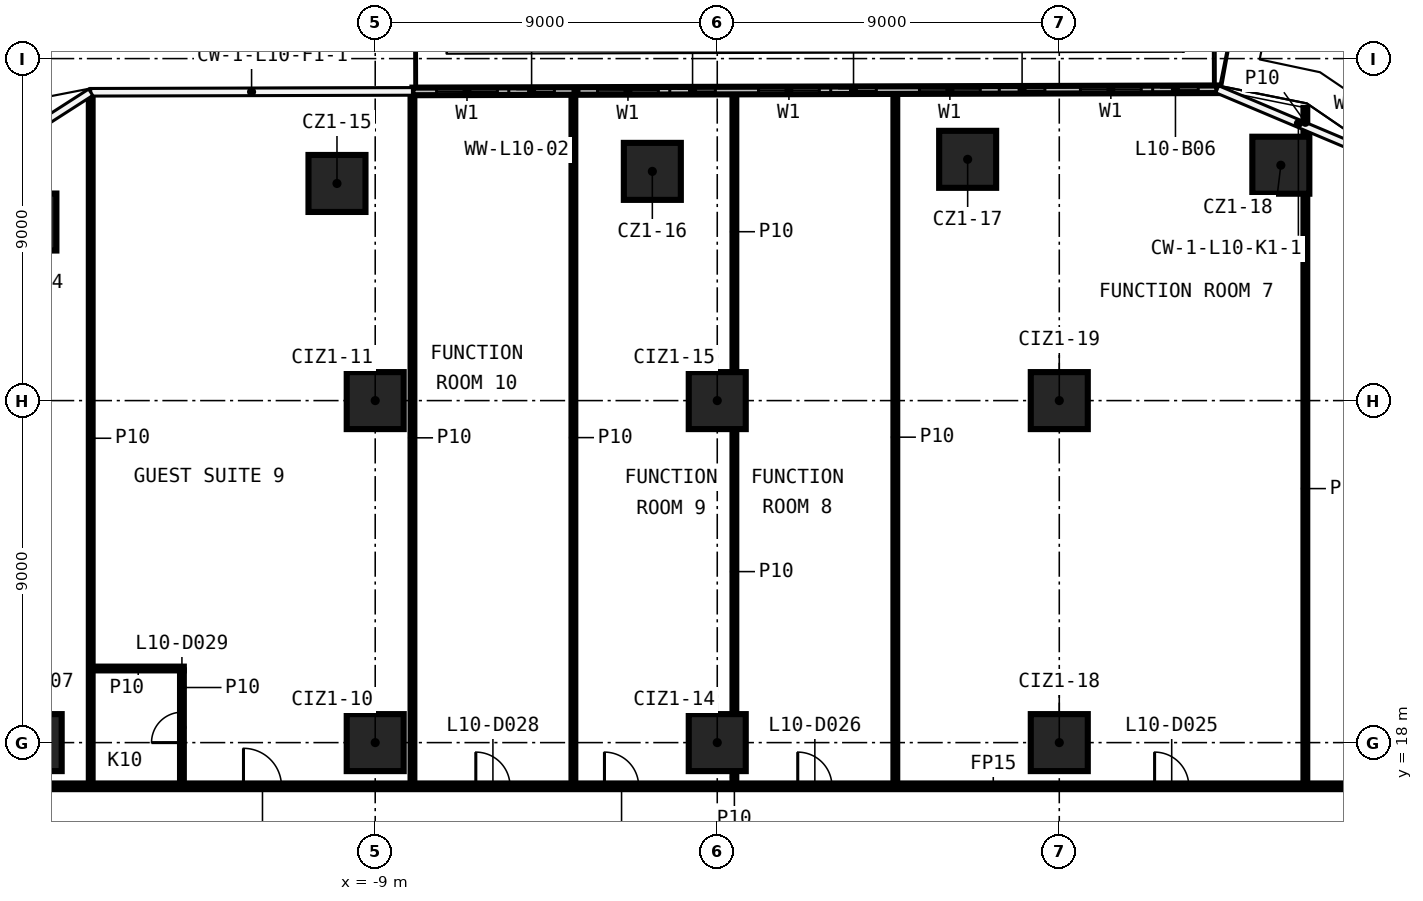
"""IFC4 building model, lengths in metres.
Left out: names, types, materials, properties, quantities, classifications, styles, units other than length and angle.
Written with IfcOpenShell. Run it as: python <this file> out.ifc"""

import sys

from ifc_helpers import new_model, si_unit, direction, frame, frame_2d, origin, origin_2d, place, context, subcontext, project, spatial, rectangle, extrude, element, fill, save


model = new_model("IFC4")
c1 = context("Model", 3, precision=1e-05, world=origin(), true_north=direction((0.0, 1.0)))
c2 = subcontext(c1, "Body", "Model", "MODEL_VIEW")
j1 = project(units=[si_unit("LENGTHUNIT", "METRE"), si_unit("PLANEANGLEUNIT", "RADIAN")], contexts=[c1])
p1 = place(None, origin())
s1 = spatial("IfcSite", under=j1, at=p1, CompositionType="ELEMENT")
p2 = place(p1, origin())
s2 = spatial("IfcBuilding", under=s1, at=p2, CompositionType="ELEMENT")
p3 = place(p2, frame((0.0, 0.0, 58.8)))
s3 = spatial("IfcBuildingStorey", under=s2, at=p3, CompositionType="ELEMENT", Elevation=58.8)
for number, where, z_axis, x_axis in (
    (1, (-18.139, 31.699, 0.0), (0.0, 0.0, 1.0), (1.0, 0.0, 0.0)),
    (2, (-10.006, 32.714, 0.0), (0.0, 0.0, 1.0), (1.0, 0.0, 0.0)),
    (3, (-1.708, 33.032, 0.0), (0.0, 0.0, 1.0), (1.0, 0.0, 0.0)),
    (4, (6.589, 33.349, 0.0), (0.0, 0.0, 1.0), (1.0, 0.0, 0.0)),
    (5, (14.83, 33.194, 0.0), (0.0, 0.0, 1.0), (1.0, 0.0, 0.0)),
    (6, (-18.0, 18.0, 0.0), (0.0, 0.0, 1.0), (1.0, 0.0, 0.0)),
    (7, (-9.0, 18.0, 0.0), (0.0, 0.0, 1.0), (1.0, 0.0, 0.0)),
    (8, (-9.0, 27.0, 0.0), (0.0, 0.0, 1.0), (1.0, 0.0, 0.0)),
    (9, (0.0, 18.0, 0.0), (0.0, 0.0, 1.0), (1.0, 0.0, 0.0)),
    (10, (0.0, 27.0, 0.0), (0.0, 0.0, 1.0), (1.0, 0.0, 0.0)),
    (11, (9.0, 18.0, 0.0), (0.0, 0.0, 1.0), (1.0, 0.0, 0.0)),
    (12, (9.0, 27.0, 0.0), (0.0, 0.0, 1.0), (1.0, 0.0, 0.0)),
):
    element("IfcColumn", number, at=place(p3, frame(where, z_axis=z_axis, x_axis=x_axis)), inside=s3, PredefinedType="COLUMN", context=c2, shape_type="SweptSolid", body=[
        extrude(rectangle(XDim=1.5, YDim=1.5, at=origin_2d()), origin(), (0.0, 0.0, 1.0), 3.3),
    ])
p4 = place(p3, frame((-19.925, 16.85, 0.0), z_axis=(0.0, 0.0, 1.0), x_axis=(1.0, 0.0, 0.0)))
e13 = element("IfcWall", 13, at=p4, inside=s3, PredefinedType="PARTITIONING", context=c2, shape_type="SweptSolid", body=[
    extrude(rectangle(XDim=39.85, YDim=0.15, at=frame_2d((19.925, 0.0))), origin(), (0.0, 0.0, 1.0), 3.3),
])
p5 = place(p4, frame((31.433, 0.0, 0.0)))
e14 = element("IfcOpeningElement", 14, at=p5, cuts=e13, PredefinedType="OPENING", context=c2, shape_type="SweptSolid", body=[
    extrude(rectangle(XDim=0.9, YDim=2.1, at=frame_2d((0.45, 1.05))), frame((0.0, 0.085, 0.0), z_axis=(0.0, -1.0, 0.0), x_axis=(1.0, 0.0, 0.0)), (0.0, 0.0, 1.0), 0.17),
])
p6 = place(p4, frame((22.043, 0.0, 0.0)))
e15 = element("IfcOpeningElement", 15, at=p6, cuts=e13, PredefinedType="OPENING", context=c2, shape_type="SweptSolid", body=[
    extrude(rectangle(XDim=0.9, YDim=2.1, at=frame_2d((0.45, 1.05))), frame((0.0, 0.085, 0.0), z_axis=(0.0, -1.0, 0.0), x_axis=(1.0, 0.0, 0.0)), (0.0, 0.0, 1.0), 0.17),
])
p7 = place(p4, frame((16.957, 0.0, 0.0)))
e16 = element("IfcOpeningElement", 16, at=p7, cuts=e13, PredefinedType="OPENING", context=c2, shape_type="SweptSolid", body=[
    extrude(rectangle(XDim=0.9, YDim=2.1, at=frame_2d((0.45, 1.05))), frame((0.0, 0.085, 0.0), z_axis=(0.0, -1.0, 0.0), x_axis=(1.0, 0.0, 0.0)), (0.0, 0.0, 1.0), 0.17),
])
p8 = place(p4, frame((13.572, 0.0, 0.0)))
e17 = element("IfcOpeningElement", 17, at=p8, cuts=e13, PredefinedType="OPENING", context=c2, shape_type="SweptSolid", body=[
    extrude(rectangle(XDim=0.9, YDim=2.1, at=frame_2d((0.45, 1.05))), frame((0.0, 0.085, 0.0), z_axis=(0.0, -1.0, 0.0), x_axis=(1.0, 0.0, 0.0)), (0.0, 0.0, 1.0), 0.17),
])
p9 = place(p4, frame((7.458, 0.0, 0.0)))
e18 = element("IfcOpeningElement", 18, at=p9, cuts=e13, PredefinedType="OPENING", context=c2, shape_type="SweptSolid", body=[
    extrude(rectangle(XDim=1.0, YDim=2.1, at=frame_2d((0.5, 1.05))), frame((0.0, 0.085, 0.0), z_axis=(0.0, -1.0, 0.0), x_axis=(1.0, 0.0, 0.0)), (0.0, 0.0, 1.0), 0.17),
])
p10 = place(p3, frame((-16.436, 19.95, 0.0), z_axis=(0.0, 0.0, 1.0), x_axis=(1.0, 0.0, 0.0)))
e19 = element("IfcWall", 19, at=p10, inside=s3, PredefinedType="PARTITIONING", context=c2, shape_type="SweptSolid", body=[
    extrude(rectangle(XDim=2.4, YDim=0.1, at=frame_2d((1.2, 0.0))), origin(), (0.0, 0.0, 1.0), 3.3),
])
p11 = place(p3, frame((15.475, 16.925, 0.0), z_axis=(0.0, 0.0, 1.0), x_axis=(0.0, 1.0, 0.0)))
e20 = element("IfcWall", 20, at=p11, inside=s3, PredefinedType="PARTITIONING", context=c2, shape_type="SweptSolid", body=[
    extrude(rectangle(XDim=15.519, YDim=0.1, at=frame_2d((7.76, 0.0))), origin(), (0.0, 0.0, 1.0), 3.3),
])
p12 = place(p3, frame((15.475, 33.944, 0.0), z_axis=(0.0, 0.0, 1.0), x_axis=(0.0, 1.0, 0.0)))
e21 = element("IfcWall", 21, at=p12, inside=s3, PredefinedType="PARTITIONING", context=c2, shape_type="SweptSolid", body=[
    extrude(rectangle(XDim=0.759, YDim=0.1, at=frame_2d((0.379, 0.0))), origin(), (0.0, 0.0, 1.0), 3.3),
])
p13 = place(p3, frame((4.686, 16.925, 0.0), z_axis=(0.0, 0.0, 1.0), x_axis=(0.0, 1.0, 0.0)))
e22 = element("IfcWall", 22, at=p13, inside=s3, PredefinedType="PARTITIONING", context=c2, shape_type="SweptSolid", body=[
    extrude(rectangle(XDim=18.225, YDim=0.1, at=frame_2d((9.112, 0.0))), origin(), (0.0, 0.0, 1.0), 3.3),
])
p14 = place(p3, frame((0.451, 16.925, 0.0), z_axis=(0.0, 0.0, 1.0), x_axis=(0.0, 1.0, 0.0)))
e23 = element("IfcWall", 23, at=p14, inside=s3, PredefinedType="PARTITIONING", context=c2, shape_type="SweptSolid", body=[
    extrude(rectangle(XDim=0.325, YDim=0.1, at=frame_2d((0.163, 0.0))), origin(), (0.0, 0.0, 1.0), 3.3),
])
p15 = place(p3, frame((0.451, 18.75, 0.0), z_axis=(0.0, 0.0, 1.0), x_axis=(0.0, 1.0, 0.0)))
e24 = element("IfcWall", 24, at=p15, inside=s3, PredefinedType="PARTITIONING", context=c2, shape_type="SweptSolid", body=[
    extrude(rectangle(XDim=7.5, YDim=0.1, at=frame_2d((3.75, 0.0))), origin(), (0.0, 0.0, 1.0), 3.3),
])
p16 = place(p3, frame((0.451, 27.75, 0.0), z_axis=(0.0, 0.0, 1.0), x_axis=(0.0, 1.0, 0.0)))
e25 = element("IfcWall", 25, at=p16, inside=s3, PredefinedType="PARTITIONING", context=c2, shape_type="SweptSolid", body=[
    extrude(rectangle(XDim=7.389, YDim=0.1, at=frame_2d((3.694, 0.0))), origin(), (0.0, 0.0, 1.0), 3.3),
])
p17 = place(p3, frame((-3.785, 16.925, 0.0), z_axis=(0.0, 0.0, 1.0), x_axis=(0.0, 1.0, 0.0)))
e26 = element("IfcWall", 26, at=p17, inside=s3, PredefinedType="PARTITIONING", context=c2, shape_type="SweptSolid", body=[
    extrude(rectangle(XDim=18.202, YDim=0.1, at=frame_2d((9.101, 0.0))), origin(), (0.0, 0.0, 1.0), 3.3),
])
p18 = place(p3, frame((-8.02, 16.925, 0.0), z_axis=(0.0, 0.0, 1.0), x_axis=(0.0, 1.0, 0.0)))
e27 = element("IfcWall", 27, at=p18, inside=s3, PredefinedType="PARTITIONING", context=c2, shape_type="SweptSolid", body=[
    extrude(rectangle(XDim=18.191, YDim=0.1, at=frame_2d((9.096, 0.0))), origin(), (0.0, 0.0, 1.0), 3.3),
])
p19 = place(p3, frame((-14.086, 16.925, 0.0), z_axis=(0.0, 0.0, 1.0), x_axis=(0.0, 1.0, 0.0)))
e28 = element("IfcWall", 28, at=p19, inside=s3, PredefinedType="PARTITIONING", context=c2, shape_type="SweptSolid", body=[
    extrude(rectangle(XDim=2.975, YDim=0.1, at=frame_2d((1.487, 0.0))), origin(), (0.0, 0.0, 1.0), 3.3),
])
p20 = place(p19, frame((1.075, 0.0, 0.0)))
e29 = element("IfcOpeningElement", 29, at=p20, cuts=e28, PredefinedType="OPENING", context=c2, shape_type="SweptSolid", body=[
    extrude(rectangle(XDim=0.8, YDim=2.1, at=frame_2d((0.4, 1.05))), frame((0.0, 0.06, 0.0), z_axis=(0.0, -1.0, 0.0), x_axis=(1.0, 0.0, 0.0)), (0.0, 0.0, 1.0), 0.12),
])
p21 = place(p3, frame((-16.486, 16.925, 0.0), z_axis=(0.0, 0.0, 1.0), x_axis=(0.0, 1.0, 0.0)))
e30 = element("IfcWall", 30, at=p21, inside=s3, PredefinedType="PARTITIONING", context=c2, shape_type="SweptSolid", body=[
    extrude(rectangle(XDim=18.168, YDim=0.1, at=frame_2d((9.084, 0.0))), origin(), (0.0, 0.0, 1.0), 3.3),
])
p22 = place(p3, frame((13.157, 35.193, 0.0), z_axis=(0.0, 0.0, 1.0), x_axis=(-0.99999645413, -0.00266302965, 0.0)))
e31 = element("IfcWall", 31, at=p22, inside=s3, PredefinedType="SOLIDWALL", context=c2, shape_type="SweptSolid", body=[
    extrude(rectangle(XDim=21.177, YDim=0.2, at=frame_2d((10.589, 0.0))), origin(), (0.0, 0.0, 1.0), 3.3),
])
p23 = place(p22, frame((2.0, 0.0, 0.6)))
e32 = element("IfcOpeningElement", 32, at=p23, cuts=e31, PredefinedType="OPENING", context=c2, shape_type="SweptSolid", body=[
    extrude(rectangle(XDim=1.6, YDim=2.4, at=frame_2d((0.8, 1.2))), frame((0.0, 0.11, 0.0), z_axis=(0.0, -1.0, 0.0), x_axis=(1.0, 0.0, 0.0)), (0.0, 0.0, 1.0), 0.22),
])
p24 = place(p22, frame((0.5, 0.0, 0.0)))
e33 = element("IfcOpeningElement", 33, at=p24, cuts=e31, PredefinedType="OPENING", context=c2, shape_type="SweptSolid", body=[
    extrude(rectangle(XDim=1.2, YDim=2.4, at=frame_2d((0.6, 1.2))), frame((0.0, 0.11, 0.0), z_axis=(0.0, -1.0, 0.0), x_axis=(1.0, 0.0, 0.0)), (0.0, 0.0, 1.0), 0.22),
])
p25 = place(p22, frame((6.236, 0.0, 0.6)))
e34 = element("IfcOpeningElement", 34, at=p25, cuts=e31, PredefinedType="OPENING", context=c2, shape_type="SweptSolid", body=[
    extrude(rectangle(XDim=1.6, YDim=2.4, at=frame_2d((0.8, 1.2))), frame((0.0, 0.11, 0.0), z_axis=(0.0, -1.0, 0.0), x_axis=(1.0, 0.0, 0.0)), (0.0, 0.0, 1.0), 0.22),
])
p26 = place(p22, frame((4.535, 0.0, 0.0)))
e35 = element("IfcOpeningElement", 35, at=p26, cuts=e31, PredefinedType="OPENING", context=c2, shape_type="SweptSolid", body=[
    extrude(rectangle(XDim=1.2, YDim=2.4, at=frame_2d((0.6, 1.2))), frame((0.0, 0.11, 0.0), z_axis=(0.0, -1.0, 0.0), x_axis=(1.0, 0.0, 0.0)), (0.0, 0.0, 1.0), 0.22),
])
p27 = place(p22, frame((10.471, 0.0, 0.6)))
e36 = element("IfcOpeningElement", 36, at=p27, cuts=e31, PredefinedType="OPENING", context=c2, shape_type="SweptSolid", body=[
    extrude(rectangle(XDim=1.6, YDim=2.4, at=frame_2d((0.8, 1.2))), frame((0.0, 0.11, 0.0), z_axis=(0.0, -1.0, 0.0), x_axis=(1.0, 0.0, 0.0)), (0.0, 0.0, 1.0), 0.22),
])
p28 = place(p22, frame((8.971, 0.0, 0.0)))
e37 = element("IfcOpeningElement", 37, at=p28, cuts=e31, PredefinedType="OPENING", context=c2, shape_type="SweptSolid", body=[
    extrude(rectangle(XDim=1.2, YDim=2.4, at=frame_2d((0.6, 1.2))), frame((0.0, 0.11, 0.0), z_axis=(0.0, -1.0, 0.0), x_axis=(1.0, 0.0, 0.0)), (0.0, 0.0, 1.0), 0.22),
])
p29 = place(p22, frame((14.707, 0.0, 0.6)))
e38 = element("IfcOpeningElement", 38, at=p29, cuts=e31, PredefinedType="OPENING", context=c2, shape_type="SweptSolid", body=[
    extrude(rectangle(XDim=1.6, YDim=2.4, at=frame_2d((0.8, 1.2))), frame((0.0, 0.11, 0.0), z_axis=(0.0, -1.0, 0.0), x_axis=(1.0, 0.0, 0.0)), (0.0, 0.0, 1.0), 0.22),
])
p30 = place(p22, frame((13.207, 0.0, 0.0)))
e39 = element("IfcOpeningElement", 39, at=p30, cuts=e31, PredefinedType="OPENING", context=c2, shape_type="SweptSolid", body=[
    extrude(rectangle(XDim=1.2, YDim=2.4, at=frame_2d((0.6, 1.2))), frame((0.0, 0.11, 0.0), z_axis=(0.0, -1.0, 0.0), x_axis=(1.0, 0.0, 0.0)), (0.0, 0.0, 1.0), 0.22),
])
p31 = place(p22, frame((18.942, 0.0, 0.6)))
e40 = element("IfcOpeningElement", 40, at=p31, cuts=e31, PredefinedType="OPENING", context=c2, shape_type="SweptSolid", body=[
    extrude(rectangle(XDim=1.6, YDim=2.4, at=frame_2d((0.8, 1.2))), frame((0.0, 0.11, 0.0), z_axis=(0.0, -1.0, 0.0), x_axis=(1.0, 0.0, 0.0)), (0.0, 0.0, 1.0), 0.22),
])
p32 = place(p22, frame((17.442, 0.0, 0.0)))
e41 = element("IfcOpeningElement", 41, at=p32, cuts=e31, PredefinedType="OPENING", context=c2, shape_type="SweptSolid", body=[
    extrude(rectangle(XDim=1.2, YDim=2.4, at=frame_2d((0.6, 1.2))), frame((0.0, 0.11, 0.0), z_axis=(0.0, -1.0, 0.0), x_axis=(1.0, 0.0, 0.0)), (0.0, 0.0, 1.0), 0.22),
])
p33 = place(p5, origin())
e42 = element("IfcDoor", 42, at=p33, inside=s3, OperationType="SINGLE_SWING_LEFT", PredefinedType="DOOR", context=c2, shape_type="SweptSolid", body=[
    extrude(rectangle(XDim=0.9, YDim=2.1, at=frame_2d((0.45, 1.05))), frame((0.0, 0.025, 0.0), z_axis=(0.0, -1.0, 0.0), x_axis=(1.0, 0.0, 0.0)), (0.0, 0.0, 1.0), 0.05),
])
fill(e14, e42)
p34 = place(p6, origin())
e43 = element("IfcDoor", 43, at=p34, inside=s3, OperationType="SINGLE_SWING_RIGHT", PredefinedType="DOOR", context=c2, shape_type="SweptSolid", body=[
    extrude(rectangle(XDim=0.9, YDim=2.1, at=frame_2d((0.45, 1.05))), frame((0.0, 0.025, 0.0), z_axis=(0.0, -1.0, 0.0), x_axis=(1.0, 0.0, 0.0)), (0.0, 0.0, 1.0), 0.05),
])
fill(e15, e43)
p35 = place(p7, origin())
e44 = element("IfcDoor", 44, at=p35, inside=s3, OperationType="SINGLE_SWING_LEFT", PredefinedType="DOOR", context=c2, shape_type="SweptSolid", body=[
    extrude(rectangle(XDim=0.9, YDim=2.1, at=frame_2d((0.45, 1.05))), frame((0.0, 0.025, 0.0), z_axis=(0.0, -1.0, 0.0), x_axis=(1.0, 0.0, 0.0)), (0.0, 0.0, 1.0), 0.05),
])
fill(e16, e44)
p36 = place(p8, origin())
e45 = element("IfcDoor", 45, at=p36, inside=s3, OperationType="SINGLE_SWING_RIGHT", PredefinedType="DOOR", context=c2, shape_type="SweptSolid", body=[
    extrude(rectangle(XDim=0.9, YDim=2.1, at=frame_2d((0.45, 1.05))), frame((0.0, 0.025, 0.0), z_axis=(0.0, -1.0, 0.0), x_axis=(1.0, 0.0, 0.0)), (0.0, 0.0, 1.0), 0.05),
])
fill(e17, e45)
p37 = place(p20, origin())
e46 = element("IfcDoor", 46, at=p37, inside=s3, OperationType="SINGLE_SWING_RIGHT", PredefinedType="DOOR", context=c2, shape_type="SweptSolid", body=[
    extrude(rectangle(XDim=0.8, YDim=2.1, at=frame_2d((0.4, 1.05))), frame((0.0, 0.025, 0.0), z_axis=(0.0, -1.0, 0.0), x_axis=(1.0, 0.0, 0.0)), (0.0, 0.0, 1.0), 0.05),
])
fill(e29, e46)
p38 = place(p9, origin())
e47 = element("IfcDoor", 47, at=p38, inside=s3, OperationType="SINGLE_SWING_LEFT", PredefinedType="DOOR", context=c2, shape_type="SweptSolid", body=[
    extrude(rectangle(XDim=1.0, YDim=2.1, at=frame_2d((0.5, 1.05))), frame((0.0, 0.025, 0.0), z_axis=(0.0, -1.0, 0.0), x_axis=(1.0, 0.0, 0.0)), (0.0, 0.0, 1.0), 0.05),
])
fill(e18, e47)
p39 = place(p23, origin())
e48 = element("IfcWindow", 48, at=p39, inside=s3, PartitioningType="SINGLE_PANEL", PredefinedType="WINDOW", context=c2, shape_type="SweptSolid", body=[
    extrude(rectangle(XDim=1.6, YDim=2.4, at=frame_2d((0.8, 1.2))), frame((0.0, 0.03, 0.0), z_axis=(0.0, -1.0, 0.0), x_axis=(1.0, 0.0, 0.0)), (0.0, 0.0, 1.0), 0.06),
])
fill(e32, e48)
p40 = place(p24, origin())
e49 = element("IfcDoor", 49, at=p40, inside=s3, OperationType="SLIDING_TO_LEFT", PredefinedType="DOOR", context=c2, shape_type="SweptSolid", body=[
    extrude(rectangle(XDim=1.2, YDim=2.4, at=frame_2d((0.6, 1.2))), frame((0.0, 0.025, 0.0), z_axis=(0.0, -1.0, 0.0), x_axis=(1.0, 0.0, 0.0)), (0.0, 0.0, 1.0), 0.05),
])
fill(e33, e49)
p41 = place(p25, origin())
e50 = element("IfcWindow", 50, at=p41, inside=s3, PartitioningType="SINGLE_PANEL", PredefinedType="WINDOW", context=c2, shape_type="SweptSolid", body=[
    extrude(rectangle(XDim=1.6, YDim=2.4, at=frame_2d((0.8, 1.2))), frame((0.0, 0.03, 0.0), z_axis=(0.0, -1.0, 0.0), x_axis=(1.0, 0.0, 0.0)), (0.0, 0.0, 1.0), 0.06),
])
fill(e34, e50)
p42 = place(p26, origin())
e51 = element("IfcDoor", 51, at=p42, inside=s3, OperationType="SLIDING_TO_LEFT", PredefinedType="DOOR", context=c2, shape_type="SweptSolid", body=[
    extrude(rectangle(XDim=1.2, YDim=2.4, at=frame_2d((0.6, 1.2))), frame((0.0, 0.025, 0.0), z_axis=(0.0, -1.0, 0.0), x_axis=(1.0, 0.0, 0.0)), (0.0, 0.0, 1.0), 0.05),
])
fill(e35, e51)
p43 = place(p27, origin())
e52 = element("IfcWindow", 52, at=p43, inside=s3, PartitioningType="SINGLE_PANEL", PredefinedType="WINDOW", context=c2, shape_type="SweptSolid", body=[
    extrude(rectangle(XDim=1.6, YDim=2.4, at=frame_2d((0.8, 1.2))), frame((0.0, 0.03, 0.0), z_axis=(0.0, -1.0, 0.0), x_axis=(1.0, 0.0, 0.0)), (0.0, 0.0, 1.0), 0.06),
])
fill(e36, e52)
p44 = place(p28, origin())
e53 = element("IfcDoor", 53, at=p44, inside=s3, OperationType="SLIDING_TO_LEFT", PredefinedType="DOOR", context=c2, shape_type="SweptSolid", body=[
    extrude(rectangle(XDim=1.2, YDim=2.4, at=frame_2d((0.6, 1.2))), frame((0.0, 0.025, 0.0), z_axis=(0.0, -1.0, 0.0), x_axis=(1.0, 0.0, 0.0)), (0.0, 0.0, 1.0), 0.05),
])
fill(e37, e53)
p45 = place(p29, origin())
e54 = element("IfcWindow", 54, at=p45, inside=s3, PartitioningType="SINGLE_PANEL", PredefinedType="WINDOW", context=c2, shape_type="SweptSolid", body=[
    extrude(rectangle(XDim=1.6, YDim=2.4, at=frame_2d((0.8, 1.2))), frame((0.0, 0.03, 0.0), z_axis=(0.0, -1.0, 0.0), x_axis=(1.0, 0.0, 0.0)), (0.0, 0.0, 1.0), 0.06),
])
fill(e38, e54)
p46 = place(p30, origin())
e55 = element("IfcDoor", 55, at=p46, inside=s3, OperationType="SLIDING_TO_LEFT", PredefinedType="DOOR", context=c2, shape_type="SweptSolid", body=[
    extrude(rectangle(XDim=1.2, YDim=2.4, at=frame_2d((0.6, 1.2))), frame((0.0, 0.025, 0.0), z_axis=(0.0, -1.0, 0.0), x_axis=(1.0, 0.0, 0.0)), (0.0, 0.0, 1.0), 0.05),
])
fill(e39, e55)
p47 = place(p31, origin())
e56 = element("IfcWindow", 56, at=p47, inside=s3, PartitioningType="SINGLE_PANEL", PredefinedType="WINDOW", context=c2, shape_type="SweptSolid", body=[
    extrude(rectangle(XDim=1.6, YDim=2.4, at=frame_2d((0.8, 1.2))), frame((0.0, 0.03, 0.0), z_axis=(0.0, -1.0, 0.0), x_axis=(1.0, 0.0, 0.0)), (0.0, 0.0, 1.0), 0.06),
])
fill(e40, e56)
p48 = place(p32, origin())
e57 = element("IfcDoor", 57, at=p48, inside=s3, OperationType="SLIDING_TO_LEFT", PredefinedType="DOOR", context=c2, shape_type="SweptSolid", body=[
    extrude(rectangle(XDim=1.2, YDim=2.4, at=frame_2d((0.6, 1.2))), frame((0.0, 0.025, 0.0), z_axis=(0.0, -1.0, 0.0), x_axis=(1.0, 0.0, 0.0)), (0.0, 0.0, 1.0), 0.05),
])
fill(e41, e57)
save(model, sys.argv[1])
